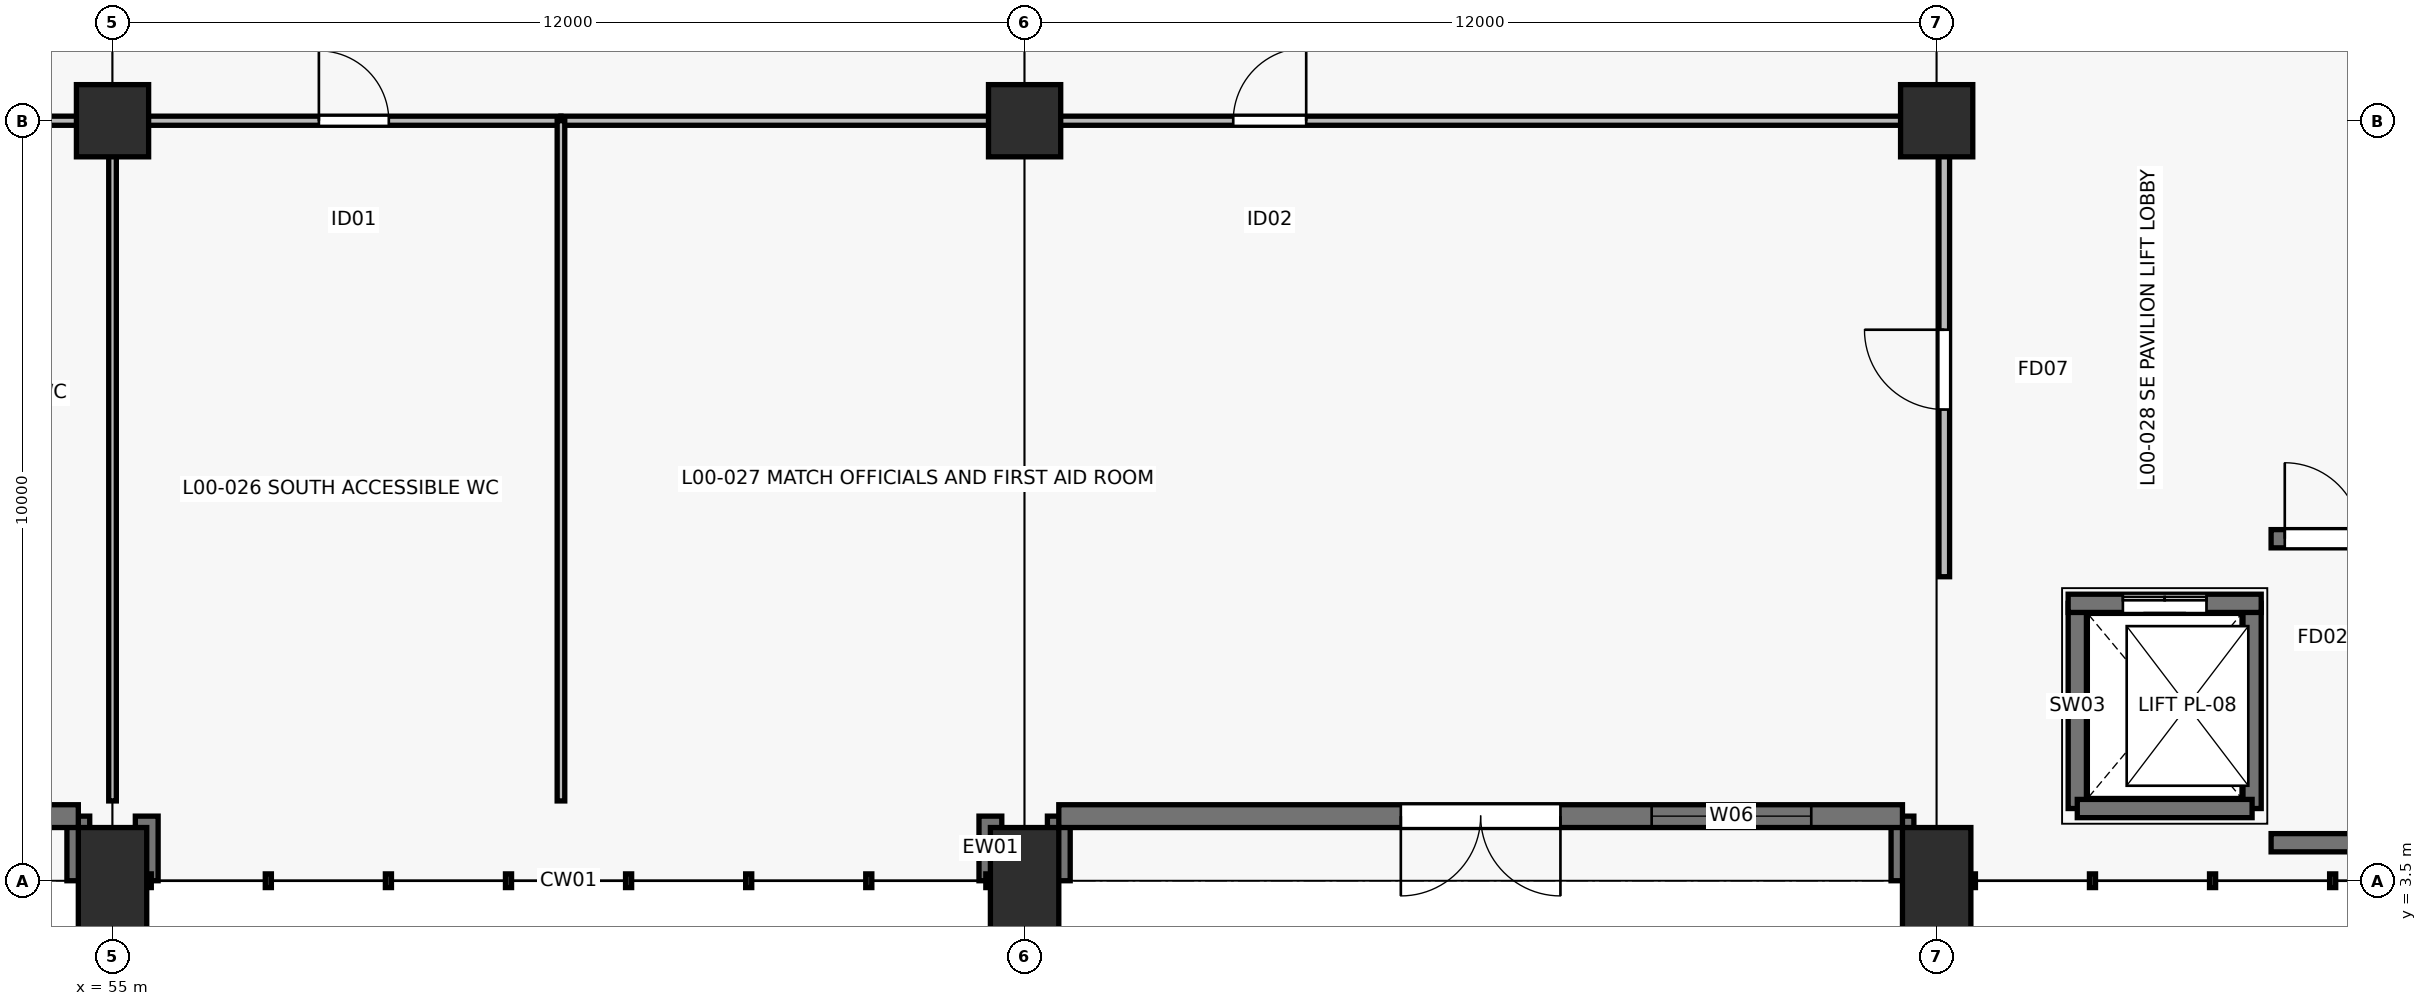
"""IFC4 building model, lengths in metres.
Left out: names, types, materials, properties, quantities, classifications, styles, units other than length and angle.
Written with IfcOpenShell. Run it as: python <this file> out.ifc"""

import sys

from ifc_helpers import new_model, si_unit, direction, frame, frame_2d, origin, origin_2d, place, context, subcontext, project, spatial, rectangle, extrude, element, fill, save


model = new_model("IFC4")
c1 = context("Model", 3, precision=1e-05, world=origin(), true_north=direction((0.0, 1.0)))
c2 = subcontext(c1, "Body", "Model", "MODEL_VIEW")
j1 = project(units=[si_unit("LENGTHUNIT", "METRE"), si_unit("PLANEANGLEUNIT", "RADIAN")], contexts=[c1])
p1 = place(None, origin())
s1 = spatial("IfcSite", under=j1, at=p1, CompositionType="ELEMENT")
p2 = place(p1, origin())
s2 = spatial("IfcBuilding", under=s1, at=p2, CompositionType="ELEMENT")
p3 = place(p2, origin())
s3 = spatial("IfcBuildingStorey", under=s2, at=p3, CompositionType="ELEMENT", Elevation=0.0)
p4 = place(p3, frame((55.0, 3.5, 0.0), z_axis=(0.0, 0.0, 1.0), x_axis=(1.0, 0.0, 0.0)))
e1 = element("IfcColumn", 1, at=p4, inside=s3, PredefinedType="PILASTER", context=c2, shape_type="SweptSolid", body=[
    extrude(rectangle(XDim=0.9, YDim=1.4, at=origin_2d()), origin(), (0.0, 0.0, 1.0), 4.8),
])
p5 = place(p3, frame((55.0, 13.5, 0.0), z_axis=(0.0, 0.0, 1.0), x_axis=(1.0, 0.0, 0.0)))
e2 = element("IfcColumn", 2, at=p5, inside=s3, PredefinedType="COLUMN", context=c2, shape_type="SweptSolid", body=[
    extrude(rectangle(XDim=0.95, YDim=0.95, at=origin_2d()), origin(), (0.0, 0.0, 1.0), 4.8),
])
p6 = place(p3, frame((67.0, 3.5, 0.0), z_axis=(0.0, 0.0, 1.0), x_axis=(1.0, 0.0, 0.0)))
e3 = element("IfcColumn", 3, at=p6, inside=s3, PredefinedType="PILASTER", context=c2, shape_type="SweptSolid", body=[
    extrude(rectangle(XDim=0.9, YDim=1.4, at=origin_2d()), origin(), (0.0, 0.0, 1.0), 4.8),
])
p7 = place(p3, frame((67.0, 13.5, 0.0), z_axis=(0.0, 0.0, 1.0), x_axis=(1.0, 0.0, 0.0)))
e4 = element("IfcColumn", 4, at=p7, inside=s3, PredefinedType="COLUMN", context=c2, shape_type="SweptSolid", body=[
    extrude(rectangle(XDim=0.95, YDim=0.95, at=origin_2d()), origin(), (0.0, 0.0, 1.0), 4.8),
])
p8 = place(p3, frame((79.0, 3.5, 0.0), z_axis=(0.0, 0.0, 1.0), x_axis=(1.0, 0.0, 0.0)))
e5 = element("IfcColumn", 5, at=p8, inside=s3, PredefinedType="PILASTER", context=c2, shape_type="SweptSolid", body=[
    extrude(rectangle(XDim=0.9, YDim=1.4, at=origin_2d()), origin(), (0.0, 0.0, 1.0), 4.8),
])
p9 = place(p3, frame((79.0, 13.5, 0.0), z_axis=(0.0, 0.0, 1.0), x_axis=(1.0, 0.0, 0.0)))
e6 = element("IfcColumn", 6, at=p9, inside=s3, PredefinedType="COLUMN", context=c2, shape_type="SweptSolid", body=[
    extrude(rectangle(XDim=0.95, YDim=0.95, at=origin_2d()), origin(), (0.0, 0.0, 1.0), 4.8),
])
p10 = place(p3, frame((54.55, 4.35, 0.0), z_axis=(0.0, 0.0, 1.0), x_axis=(0.0, -1.0, 0.0)))
e7 = element("IfcWall", 7, at=p10, inside=s3, PredefinedType="SOLIDWALL", context=c2, shape_type="SweptSolid", body=[
    extrude(rectangle(XDim=0.85, YDim=0.3, at=frame_2d((0.425, 0.0))), origin(), (0.0, 0.0, 1.0), 4.8),
])
p11 = place(p3, frame((54.55, 4.35, 0.0), z_axis=(0.0, 0.0, 1.0), x_axis=(-1.0, 0.0, 0.0)))
e8 = element("IfcWall", 8, at=p11, inside=s3, PredefinedType="SOLIDWALL", context=c2, shape_type="SweptSolid", body=[
    extrude(rectangle(XDim=11.1, YDim=0.3, at=frame_2d((5.55, 0.0))), origin(), (0.0, 0.0, 1.0), 4.8),
])
p12 = place(p11, frame((1.8, 0.0, 0.0)))
e9 = element("IfcOpeningElement", 9, at=p12, cuts=e8, PredefinedType="OPENING", context=c2, shape_type="SweptSolid", body=[
    extrude(rectangle(XDim=2.8, YDim=2.7, at=frame_2d((1.4, 1.35))), frame((0.0, 0.16, 0.0), z_axis=(0.0, -1.0, 0.0), x_axis=(1.0, 0.0, 0.0)), (0.0, 0.0, 1.0), 0.32),
])
for number, where, z_axis, x_axis in (
    (10, (55.45, 3.5, 0.0), (0.0, 0.0, 1.0), (0.0, 1.0, 0.0)),
    (11, (66.55, 4.35, 0.0), (0.0, 0.0, 1.0), (0.0, -1.0, 0.0)),
    (12, (67.45, 3.5, 0.0), (0.0, 0.0, 1.0), (0.0, 1.0, 0.0)),
    (13, (78.55, 4.35, 0.0), (0.0, 0.0, 1.0), (0.0, -1.0, 0.0)),
):
    element("IfcWall", number, at=place(p3, frame(where, z_axis=z_axis, x_axis=x_axis)), inside=s3, PredefinedType="SOLIDWALL", context=c2, shape_type="SweptSolid", body=[
        extrude(rectangle(XDim=0.85, YDim=0.3, at=frame_2d((0.425, 0.0))), origin(), (0.0, 0.0, 1.0), 4.8),
    ])
p13 = place(p3, frame((78.55, 4.35, 0.0), z_axis=(0.0, 0.0, 1.0), x_axis=(-1.0, 0.0, 0.0)))
e14 = element("IfcWall", 14, at=p13, inside=s3, PredefinedType="SOLIDWALL", context=c2, shape_type="SweptSolid", body=[
    extrude(rectangle(XDim=11.1, YDim=0.3, at=frame_2d((5.55, 0.0))), origin(), (0.0, 0.0, 1.0), 4.8),
])
p14 = place(p13, frame((4.5, 0.0, 0.0)))
e15 = element("IfcOpeningElement", 15, at=p14, cuts=e14, PredefinedType="OPENING", context=c2, shape_type="SweptSolid", body=[
    extrude(rectangle(XDim=2.1, YDim=2.35, at=frame_2d((1.05, 1.175))), frame((0.0, 0.16, 0.0), z_axis=(0.0, -1.0, 0.0), x_axis=(1.0, 0.0, 0.0)), (0.0, 0.0, 1.0), 0.32),
])
p15 = place(p13, frame((1.2, 0.0, 1.0)))
e16 = element("IfcOpeningElement", 16, at=p15, cuts=e14, PredefinedType="OPENING", context=c2, shape_type="SweptSolid", body=[
    extrude(rectangle(XDim=2.1, YDim=1.5, at=frame_2d((1.05, 0.75))), frame((0.0, 0.16, 0.0), z_axis=(0.0, -1.0, 0.0), x_axis=(1.0, 0.0, 0.0)), (0.0, 0.0, 1.0), 0.32),
])
p16 = place(p3, frame((80.85, 4.45, -1.3), z_axis=(0.0, 0.0, 1.0), x_axis=(0.0, 1.0, 0.0)))
e17 = element("IfcWall", 17, at=p16, inside=s3, PredefinedType="SHEAR", context=c2, shape_type="SweptSolid", body=[
    extrude(rectangle(XDim=2.7, YDim=0.24, at=frame_2d((1.35, 0.0))), origin(), (0.0, 0.0, 1.0), 6.1),
])
p17 = place(p3, frame((83.15, 7.15, 0.0), z_axis=(0.0, 0.0, 1.0), x_axis=(0.0, -1.0, 0.0)))
e18 = element("IfcWall", 18, at=p17, inside=s3, PredefinedType="SHEAR", context=c2, shape_type="SweptSolid", body=[
    extrude(rectangle(XDim=2.7, YDim=0.24, at=frame_2d((1.35, 0.0))), origin(), (0.0, 0.0, 1.0), 4.8),
])
p18 = place(p3, frame((83.15, 4.45, 0.0), z_axis=(0.0, 0.0, 1.0), x_axis=(-1.0, 0.0, 0.0)))
e19 = element("IfcWall", 19, at=p18, inside=s3, PredefinedType="SHEAR", context=c2, shape_type="SweptSolid", body=[
    extrude(rectangle(XDim=2.3, YDim=0.24, at=frame_2d((1.15, 0.0))), origin(), (0.0, 0.0, 1.0), 4.8),
])
p19 = place(p3, frame((80.73, 7.15, 0.0), z_axis=(0.0, 0.0, 1.0), x_axis=(1.0, 0.0, 0.0)))
e20 = element("IfcWall", 20, at=p19, inside=s3, PredefinedType="SHEAR", context=c2, shape_type="SweptSolid", body=[
    extrude(rectangle(XDim=2.54, YDim=0.24, at=frame_2d((1.27, 0.0))), origin(), (0.0, 0.0, 1.0), 4.8),
])
p20 = place(p19, frame((0.72, 0.0, 0.0)))
e21 = element("IfcOpeningElement", 21, at=p20, cuts=e20, PredefinedType="OPENING", context=c2, shape_type="SweptSolid", body=[
    extrude(rectangle(XDim=1.1, YDim=2.15, at=frame_2d((0.55, 1.075))), frame((0.0, 0.13, 0.0), z_axis=(0.0, -1.0, 0.0), x_axis=(1.0, 0.0, 0.0)), (0.0, 0.0, 1.0), 0.26),
])
p21 = place(p3, frame((83.4, 4.0, 0.0), z_axis=(0.0, 0.0, 1.0), x_axis=(1.0, 0.0, 0.0)))
e22 = element("IfcWall", 22, at=p21, inside=s3, PredefinedType="SHEAR", context=c2, shape_type="SweptSolid", body=[
    extrude(rectangle(XDim=7.15, YDim=0.24, at=frame_2d((3.575, 0.0))), origin(), (0.0, 0.0, 1.0), 4.8),
])
p22 = place(p3, frame((83.4, 8.0, 0.0), z_axis=(0.0, 0.0, 1.0), x_axis=(1.0, 0.0, 0.0)))
e23 = element("IfcWall", 23, at=p22, inside=s3, PredefinedType="SHEAR", context=c2, shape_type="SweptSolid", body=[
    extrude(rectangle(XDim=7.15, YDim=0.24, at=frame_2d((3.575, 0.0))), origin(), (0.0, 0.0, 1.0), 4.8),
])
p23 = place(p22, frame((0.18, 0.0, 0.0)))
e24 = element("IfcOpeningElement", 24, at=p23, cuts=e23, PredefinedType="OPENING", context=c2, shape_type="SweptSolid", body=[
    extrude(rectangle(XDim=1.0, YDim=2.15, at=frame_2d((0.5, 1.075))), frame((0.0, 0.13, 0.0), z_axis=(0.0, -1.0, 0.0), x_axis=(1.0, 0.0, 0.0)), (0.0, 0.0, 1.0), 0.26),
])
p24 = place(p3, frame((79.1, 7.5, 0.0), z_axis=(0.0, 0.0, 1.0), x_axis=(0.0, 1.0, 0.0)))
e25 = element("IfcWall", 25, at=p24, inside=s3, PredefinedType="PARTITIONING", context=c2, shape_type="SweptSolid", body=[
    extrude(rectangle(XDim=5.9, YDim=0.14, at=frame_2d((2.95, 0.0))), origin(), (0.0, 0.0, 1.0), 3.645),
])
p25 = place(p24, frame((2.2, 0.0, 0.0)))
e26 = element("IfcOpeningElement", 26, at=p25, cuts=e25, PredefinedType="OPENING", context=c2, shape_type="SweptSolid", body=[
    extrude(rectangle(XDim=1.05, YDim=2.1, at=frame_2d((0.525, 1.05))), frame((0.0, 0.08, 0.0), z_axis=(0.0, -1.0, 0.0), x_axis=(1.0, 0.0, 0.0)), (0.0, 0.0, 1.0), 0.16),
])
p26 = place(p3, frame((49.1, 13.5, 0.0), z_axis=(0.0, 0.0, 1.0), x_axis=(1.0, 0.0, 0.0)))
e27 = element("IfcWall", 27, at=p26, inside=s3, PredefinedType="PARTITIONING", context=c2, shape_type="SweptSolid", body=[
    extrude(rectangle(XDim=5.45, YDim=0.12, at=frame_2d((2.725, 0.0))), origin(), (0.0, 0.0, 1.0), 3.645),
])
p27 = place(p26, frame((2.265, 0.0, 0.0)))
e28 = element("IfcOpeningElement", 28, at=p27, cuts=e27, PredefinedType="OPENING", context=c2, shape_type="SweptSolid", body=[
    extrude(rectangle(XDim=0.92, YDim=2.1, at=frame_2d((0.46, 1.05))), frame((0.0, 0.07, 0.0), z_axis=(0.0, -1.0, 0.0), x_axis=(1.0, 0.0, 0.0)), (0.0, 0.0, 1.0), 0.14),
])
p28 = place(p3, frame((55.45, 13.5, 0.0), z_axis=(0.0, 0.0, 1.0), x_axis=(1.0, 0.0, 0.0)))
e29 = element("IfcWall", 29, at=p28, inside=s3, PredefinedType="PARTITIONING", context=c2, shape_type="SweptSolid", body=[
    extrude(rectangle(XDim=5.45, YDim=0.12, at=frame_2d((2.725, 0.0))), origin(), (0.0, 0.0, 1.0), 3.645),
])
p29 = place(p28, frame((2.265, 0.0, 0.0)))
e30 = element("IfcOpeningElement", 30, at=p29, cuts=e29, PredefinedType="OPENING", context=c2, shape_type="SweptSolid", body=[
    extrude(rectangle(XDim=0.92, YDim=2.1, at=frame_2d((0.46, 1.05))), frame((0.0, 0.07, 0.0), z_axis=(0.0, -1.0, 0.0), x_axis=(1.0, 0.0, 0.0)), (0.0, 0.0, 1.0), 0.14),
])
p30 = place(p3, frame((55.0, 4.55, 0.0), z_axis=(0.0, 0.0, 1.0), x_axis=(0.0, 1.0, 0.0)))
e31 = element("IfcWall", 31, at=p30, inside=s3, PredefinedType="PARTITIONING", context=c2, shape_type="SweptSolid", body=[
    extrude(rectangle(XDim=8.95, YDim=0.1, at=frame_2d((4.475, 0.0))), origin(), (0.0, 0.0, 1.0), 3.645),
])
p31 = place(p3, frame((60.9, 13.5, 0.0), z_axis=(0.0, 0.0, 1.0), x_axis=(1.0, 0.0, 0.0)))
e32 = element("IfcWall", 32, at=p31, inside=s3, PredefinedType="PARTITIONING", context=c2, shape_type="SweptSolid", body=[
    extrude(rectangle(XDim=17.65, YDim=0.12, at=frame_2d((8.825, 0.0))), origin(), (0.0, 0.0, 1.0), 3.645),
])
p32 = place(p31, frame((8.845, 0.0, 0.0)))
e33 = element("IfcOpeningElement", 33, at=p32, cuts=e32, PredefinedType="OPENING", context=c2, shape_type="SweptSolid", body=[
    extrude(rectangle(XDim=0.96, YDim=2.1, at=frame_2d((0.48, 1.05))), frame((0.0, 0.07, 0.0), z_axis=(0.0, -1.0, 0.0), x_axis=(1.0, 0.0, 0.0)), (0.0, 0.0, 1.0), 0.14),
])
p33 = place(p3, frame((60.9, 4.55, 0.0), z_axis=(0.0, 0.0, 1.0), x_axis=(0.0, 1.0, 0.0)))
e34 = element("IfcWall", 34, at=p33, inside=s3, PredefinedType="PARTITIONING", context=c2, shape_type="SweptSolid", body=[
    extrude(rectangle(XDim=8.95, YDim=0.1, at=frame_2d((4.475, 0.0))), origin(), (0.0, 0.0, 1.0), 3.645),
])
p34 = place(p14, origin())
e35 = element("IfcDoor", 35, at=p34, inside=s3, OperationType="DOUBLE_DOOR_SINGLE_SWING", PredefinedType="DOOR", context=c2, shape_type="SweptSolid", body=[
    extrude(rectangle(XDim=2.1, YDim=2.35, at=frame_2d((1.05, 1.175))), frame((0.0, 0.025, 0.0), z_axis=(0.0, -1.0, 0.0), x_axis=(1.0, 0.0, 0.0)), (0.0, 0.0, 1.0), 0.05),
])
fill(e15, e35)
p35 = place(p15, origin())
e36 = element("IfcWindow", 36, at=p35, inside=s3, PartitioningType="DOUBLE_PANEL_VERTICAL", PredefinedType="WINDOW", context=c2, shape_type="SweptSolid", body=[
    extrude(rectangle(XDim=2.1, YDim=1.5, at=frame_2d((1.05, 0.75))), frame((0.0, 0.03, 0.0), z_axis=(0.0, -1.0, 0.0), x_axis=(1.0, 0.0, 0.0)), (0.0, 0.0, 1.0), 0.06),
])
fill(e16, e36)
p36 = place(p20, origin())
e37 = element("IfcDoor", 37, at=p36, inside=s3, OperationType="DOUBLE_DOOR_SLIDING", PredefinedType="USERDEFINED", context=c2, shape_type="SweptSolid", body=[
    extrude(rectangle(XDim=1.1, YDim=2.15, at=frame_2d((0.55, 1.075))), frame((0.0, 0.025, 0.0), z_axis=(0.0, -1.0, 0.0), x_axis=(1.0, 0.0, 0.0)), (0.0, 0.0, 1.0), 0.05),
])
fill(e21, e37)
p37 = place(p23, origin())
e38 = element("IfcDoor", 38, at=p37, inside=s3, OperationType="SINGLE_SWING_LEFT", PredefinedType="DOOR", context=c2, shape_type="SweptSolid", body=[
    extrude(rectangle(XDim=1.0, YDim=2.15, at=frame_2d((0.5, 1.075))), frame((0.0, 0.025, 0.0), z_axis=(0.0, -1.0, 0.0), x_axis=(1.0, 0.0, 0.0)), (0.0, 0.0, 1.0), 0.05),
])
fill(e24, e38)
p38 = place(p25, origin())
e39 = element("IfcDoor", 39, at=p38, inside=s3, OperationType="SINGLE_SWING_RIGHT", PredefinedType="DOOR", context=c2, shape_type="SweptSolid", body=[
    extrude(rectangle(XDim=1.05, YDim=2.1, at=frame_2d((0.525, 1.05))), frame((0.0, 0.025, 0.0), z_axis=(0.0, -1.0, 0.0), x_axis=(1.0, 0.0, 0.0)), (0.0, 0.0, 1.0), 0.05),
])
fill(e26, e39)
p39 = place(p29, origin())
e40 = element("IfcDoor", 40, at=p39, inside=s3, OperationType="SINGLE_SWING_LEFT", PredefinedType="DOOR", context=c2, shape_type="SweptSolid", body=[
    extrude(rectangle(XDim=0.92, YDim=2.1, at=frame_2d((0.46, 1.05))), frame((0.0, 0.025, 0.0), z_axis=(0.0, -1.0, 0.0), x_axis=(1.0, 0.0, 0.0)), (0.0, 0.0, 1.0), 0.05),
])
fill(e30, e40)
p40 = place(p32, origin())
e41 = element("IfcDoor", 41, at=p40, inside=s3, OperationType="SINGLE_SWING_RIGHT", PredefinedType="DOOR", context=c2, shape_type="SweptSolid", body=[
    extrude(rectangle(XDim=0.96, YDim=2.1, at=frame_2d((0.48, 1.05))), frame((0.0, 0.025, 0.0), z_axis=(0.0, -1.0, 0.0), x_axis=(1.0, 0.0, 0.0)), (0.0, 0.0, 1.0), 0.05),
])
fill(e33, e41)
save(model, sys.argv[1])
